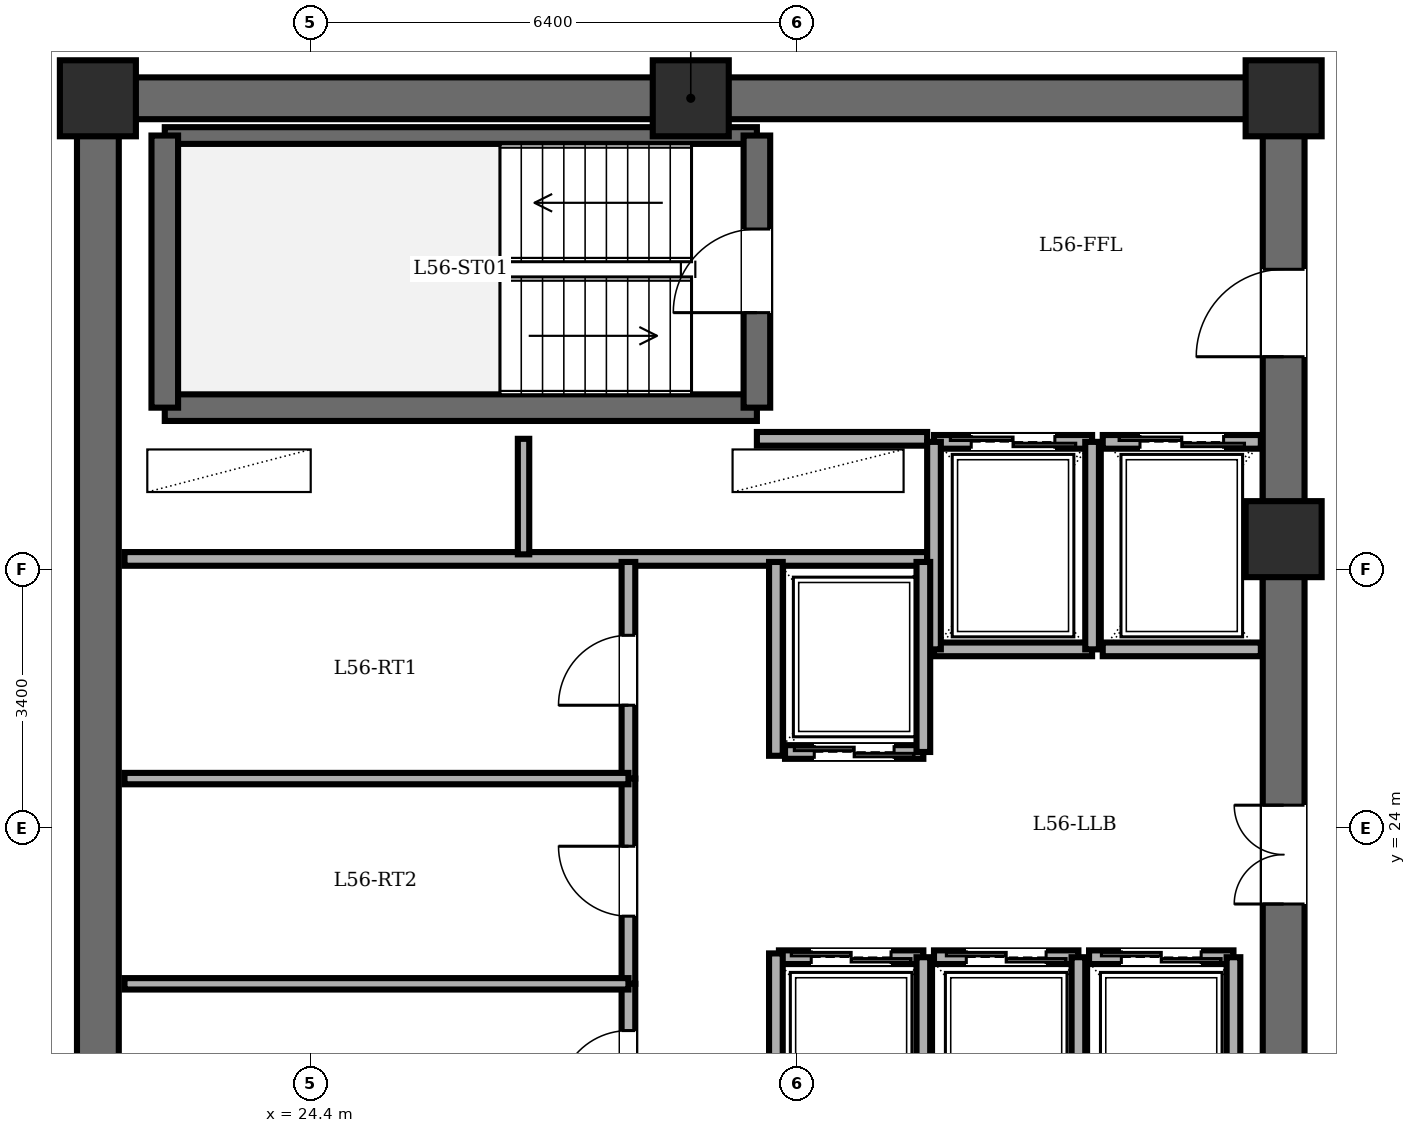
"""IFC4 building model, lengths in metres.
Left out: names, types, materials, properties, quantities, classifications, styles, units other than length and angle.
Written with IfcOpenShell. Run it as: python <this file> out.ifc"""

import sys

from ifc_helpers import new_model, si_unit, direction, frame, frame_2d, origin, origin_2d, place, context, subcontext, project, spatial, rectangle, extrude, element, fill, save


model = new_model("IFC4")
c1 = context("Model", 3, precision=1e-05, world=origin(), true_north=direction((0.0, 1.0)))
c2 = subcontext(c1, "Body", "Model", "MODEL_VIEW")
j1 = project(units=[si_unit("LENGTHUNIT", "METRE"), si_unit("PLANEANGLEUNIT", "RADIAN")], contexts=[c1])
p1 = place(None, origin())
s1 = spatial("IfcSite", under=j1, at=p1, CompositionType="ELEMENT")
p2 = place(p1, origin())
s2 = spatial("IfcBuilding", under=s1, at=p2, CompositionType="ELEMENT")
p3 = place(p2, frame((0.0, 0.0, 215.7)))
s3 = spatial("IfcBuildingStorey", under=s2, at=p3, CompositionType="ELEMENT", Elevation=215.7)
for number, where, z_axis, x_axis in (
    (1, (37.2, 27.8, 0.0), (0.0, 0.0, 1.0), (1.0, 0.0, 0.0)),
    (2, (37.2, 33.6, 0.0), (0.0, 0.0, 1.0), (1.0, 0.0, 0.0)),
    (3, (29.4, 33.6, 0.0), (0.0, 0.0, 1.0), (1.0, 0.0, 0.0)),
    (4, (21.6, 33.6, 0.0), (0.0, 0.0, 1.0), (1.0, 0.0, 0.0)),
):
    element("IfcColumn", number, at=place(p3, frame(where, z_axis=z_axis, x_axis=x_axis)), inside=s3, PredefinedType="COLUMN", context=c2, shape_type="SweptSolid", body=[
        extrude(rectangle(XDim=1.0, YDim=1.0, at=origin_2d()), origin(), (0.0, 0.0, 1.0), 3.6),
    ])
p4 = place(p3, frame((21.6, 14.4, 0.0), z_axis=(0.0, 0.0, 1.0), x_axis=(0.0, 1.0, 0.0)))
e5 = element("IfcWall", 5, at=p4, inside=s3, PredefinedType="SHEAR", context=c2, shape_type="SweptSolid", body=[
    extrude(rectangle(XDim=19.2, YDim=0.55, at=frame_2d((9.6, 0.0))), origin(), (0.0, 0.0, 1.0), 3.4),
])
p5 = place(p3, frame((21.6, 33.6, 0.0), z_axis=(0.0, 0.0, 1.0), x_axis=(1.0, 0.0, 0.0)))
e6 = element("IfcWall", 6, at=p5, inside=s3, PredefinedType="SHEAR", context=c2, shape_type="SweptSolid", body=[
    extrude(rectangle(XDim=15.6, YDim=0.55, at=frame_2d((7.8, 0.0))), origin(), (0.0, 0.0, 1.0), 3.4),
])
p6 = place(p3, frame((37.2, 14.4, 0.0), z_axis=(0.0, 0.0, 1.0), x_axis=(0.0, 1.0, 0.0)))
e7 = element("IfcWall", 7, at=p6, inside=s3, PredefinedType="SHEAR", context=c2, shape_type="SweptSolid", body=[
    extrude(rectangle(XDim=19.2, YDim=0.55, at=frame_2d((9.6, 0.0))), origin(), (0.0, 0.0, 1.0), 3.4),
])
p7 = place(p6, frame((15.8, 0.0, 0.0)))
e8 = element("IfcOpeningElement", 8, at=p7, cuts=e7, PredefinedType="OPENING", context=c2, shape_type="SweptSolid", body=[
    extrude(rectangle(XDim=1.15, YDim=2.15, at=frame_2d((0.575, 1.075))), frame((0.0, 0.285, 0.0), z_axis=(0.0, -1.0, 0.0), x_axis=(1.0, 0.0, 0.0)), (0.0, 0.0, 1.0), 0.57),
])
p8 = place(p6, frame((3.6, 0.0, 0.0)))
e9 = element("IfcOpeningElement", 9, at=p8, cuts=e7, PredefinedType="OPENING", context=c2, shape_type="SweptSolid", body=[
    extrude(rectangle(XDim=1.1, YDim=2.15, at=frame_2d((0.55, 1.075))), frame((0.0, 0.285, 0.0), z_axis=(0.0, -1.0, 0.0), x_axis=(1.0, 0.0, 0.0)), (0.0, 0.0, 1.0), 0.57),
])
p9 = place(p6, frame((8.6, 0.0, 0.0)))
e10 = element("IfcOpeningElement", 10, at=p9, cuts=e7, PredefinedType="OPENING", context=c2, shape_type="SweptSolid", body=[
    extrude(rectangle(XDim=1.3, YDim=2.2, at=frame_2d((0.65, 1.1))), frame((0.0, 0.285, 0.0), z_axis=(0.0, -1.0, 0.0), x_axis=(1.0, 0.0, 0.0)), (0.0, 0.0, 1.0), 0.57),
])
p10 = place(p3, frame((22.48, 29.53, 0.0), z_axis=(0.0, 0.0, 1.0), x_axis=(1.0, 0.0, 0.0)))
e11 = element("IfcWall", 11, at=p10, inside=s3, PredefinedType="SOLIDWALL", context=c2, shape_type="SweptSolid", body=[
    extrude(rectangle(XDim=7.79, YDim=0.35, at=frame_2d((3.895, 0.0))), origin(), (0.0, 0.0, 1.0), 3.4),
])
p11 = place(p3, frame((22.48, 33.11, 0.0), z_axis=(0.0, 0.0, 1.0), x_axis=(1.0, 0.0, 0.0)))
e12 = element("IfcWall", 12, at=p11, inside=s3, PredefinedType="PARTITIONING", context=c2, shape_type="SweptSolid", body=[
    extrude(rectangle(XDim=7.79, YDim=0.22, at=frame_2d((3.895, 0.0))), origin(), (0.0, 0.0, 1.0), 3.4),
])
p12 = place(p3, frame((22.48, 29.53, 0.0), z_axis=(0.0, 0.0, 1.0), x_axis=(0.0, 1.0, 0.0)))
e13 = element("IfcWall", 13, at=p12, inside=s3, PredefinedType="SOLIDWALL", context=c2, shape_type="SweptSolid", body=[
    extrude(rectangle(XDim=3.58, YDim=0.35, at=frame_2d((1.79, 0.0))), origin(), (0.0, 0.0, 1.0), 3.4),
])
p13 = place(p3, frame((30.27, 29.53, 0.0), z_axis=(0.0, 0.0, 1.0), x_axis=(0.0, 1.0, 0.0)))
e14 = element("IfcWall", 14, at=p13, inside=s3, PredefinedType="SOLIDWALL", context=c2, shape_type="SweptSolid", body=[
    extrude(rectangle(XDim=3.58, YDim=0.35, at=frame_2d((1.79, 0.0))), origin(), (0.0, 0.0, 1.0), 3.4),
])
p14 = place(p13, frame((1.25, 0.0, 0.0)))
e15 = element("IfcOpeningElement", 15, at=p14, cuts=e14, PredefinedType="OPENING", context=c2, shape_type="SweptSolid", body=[
    extrude(rectangle(XDim=1.1, YDim=2.15, at=frame_2d((0.55, 1.075))), frame((0.0, 0.185, 0.0), z_axis=(0.0, -1.0, 0.0), x_axis=(1.0, 0.0, 0.0)), (0.0, 0.0, 1.0), 0.37),
])
p15 = place(p3, frame((30.27, 29.12, 0.0), z_axis=(0.0, 0.0, 1.0), x_axis=(1.0, 0.0, 0.0)))
e16 = element("IfcWall", 16, at=p15, inside=s3, PredefinedType="PARTITIONING", context=c2, shape_type="SweptSolid", body=[
    extrude(rectangle(XDim=2.24, YDim=0.18, at=frame_2d((1.12, 0.0))), origin(), (0.0, 0.0, 1.0), 3.4),
])
p16 = place(p3, frame((21.95, 27.54, 0.0), z_axis=(0.0, 0.0, 1.0), x_axis=(1.0, 0.0, 0.0)))
e17 = element("IfcWall", 17, at=p16, inside=s3, PredefinedType="PARTITIONING", context=c2, shape_type="SweptSolid", body=[
    extrude(rectangle(XDim=10.56, YDim=0.18, at=frame_2d((5.28, 0.0))), origin(), (0.0, 0.0, 1.0), 3.4),
])
p17 = place(p3, frame((27.2, 27.6, 0.0), z_axis=(0.0, 0.0, 1.0), x_axis=(0.0, 1.0, 0.0)))
e18 = element("IfcWall", 18, at=p17, inside=s3, PredefinedType="PARTITIONING", context=c2, shape_type="SweptSolid", body=[
    extrude(rectangle(XDim=1.52, YDim=0.15, at=frame_2d((0.76, 0.0))), origin(), (0.0, 0.0, 1.0), 3.4),
])
p18 = place(p3, frame((32.6, 29.08, 0.0), z_axis=(0.0, 0.0, 1.0), x_axis=(1.0, 0.0, 0.0)))
e19 = element("IfcWall", 19, at=p18, inside=s3, PredefinedType="PARTITIONING", context=c2, shape_type="SweptSolid", body=[
    extrude(rectangle(XDim=2.08, YDim=0.18, at=frame_2d((1.04, 0.0))), origin(), (0.0, 0.0, 1.0), 3.4),
])
p19 = place(p18, frame((0.49, 0.0, 0.0)))
e20 = element("IfcOpeningElement", 20, at=p19, cuts=e19, PredefinedType="OPENING", context=c2, shape_type="SweptSolid", body=[
    extrude(rectangle(XDim=1.1, YDim=2.2, at=frame_2d((0.55, 1.1))), frame((0.0, 0.1, 0.0), z_axis=(0.0, -1.0, 0.0), x_axis=(1.0, 0.0, 0.0)), (0.0, 0.0, 1.0), 0.2),
])
p20 = place(p3, frame((34.68, 26.35, 0.0), z_axis=(0.0, 0.0, 1.0), x_axis=(-1.0, 0.0, 0.0)))
e21 = element("IfcWall", 21, at=p20, inside=s3, PredefinedType="PARTITIONING", context=c2, shape_type="SweptSolid", body=[
    extrude(rectangle(XDim=2.08, YDim=0.18, at=frame_2d((1.04, 0.0))), origin(), (0.0, 0.0, 1.0), 3.4),
])
for number, where, z_axis, x_axis in (
    (22, (34.68, 26.35, 0.0), (0.0, 0.0, 1.0), (0.0, 1.0, 0.0)),
    (23, (32.6, 29.08, 0.0), (0.0, 0.0, 1.0), (0.0, -1.0, 0.0)),
):
    element("IfcWall", number, at=place(p3, frame(where, z_axis=z_axis, x_axis=x_axis)), inside=s3, PredefinedType="PARTITIONING", context=c2, shape_type="SweptSolid", body=[
        extrude(rectangle(XDim=2.73, YDim=0.18, at=frame_2d((1.365, 0.0))), origin(), (0.0, 0.0, 1.0), 3.4),
    ])
p21 = place(p3, frame((34.82, 29.08, 0.0), z_axis=(0.0, 0.0, 1.0), x_axis=(1.0, 0.0, 0.0)))
e24 = element("IfcWall", 24, at=p21, inside=s3, PredefinedType="PARTITIONING", context=c2, shape_type="SweptSolid", body=[
    extrude(rectangle(XDim=2.08, YDim=0.18, at=frame_2d((1.04, 0.0))), origin(), (0.0, 0.0, 1.0), 3.4),
])
p22 = place(p21, frame((0.49, 0.0, 0.0)))
e25 = element("IfcOpeningElement", 25, at=p22, cuts=e24, PredefinedType="OPENING", context=c2, shape_type="SweptSolid", body=[
    extrude(rectangle(XDim=1.1, YDim=2.2, at=frame_2d((0.55, 1.1))), frame((0.0, 0.1, 0.0), z_axis=(0.0, -1.0, 0.0), x_axis=(1.0, 0.0, 0.0)), (0.0, 0.0, 1.0), 0.2),
])
p23 = place(p3, frame((36.9, 26.35, 0.0), z_axis=(0.0, 0.0, 1.0), x_axis=(-1.0, 0.0, 0.0)))
e26 = element("IfcWall", 26, at=p23, inside=s3, PredefinedType="PARTITIONING", context=c2, shape_type="SweptSolid", body=[
    extrude(rectangle(XDim=2.08, YDim=0.18, at=frame_2d((1.04, 0.0))), origin(), (0.0, 0.0, 1.0), 3.4),
])
p24 = place(p3, frame((32.46, 25.0, 0.0), z_axis=(0.0, 0.0, 1.0), x_axis=(-1.0, 0.0, 0.0)))
e27 = element("IfcWall", 27, at=p24, inside=s3, PredefinedType="PARTITIONING", context=c2, shape_type="SweptSolid", body=[
    extrude(rectangle(XDim=1.82, YDim=0.18, at=frame_2d((0.91, 0.0))), origin(), (0.0, 0.0, 1.0), 3.4),
])
p25 = place(p24, frame((0.385, 0.0, 0.0)))
e28 = element("IfcOpeningElement", 28, at=p25, cuts=e27, PredefinedType="OPENING", context=c2, shape_type="SweptSolid", body=[
    extrude(rectangle(XDim=1.05, YDim=2.2, at=frame_2d((0.525, 1.1))), frame((0.0, 0.1, 0.0), z_axis=(0.0, -1.0, 0.0), x_axis=(1.0, 0.0, 0.0)), (0.0, 0.0, 1.0), 0.2),
])
p26 = place(p3, frame((32.46, 25.0, 0.0), z_axis=(0.0, 0.0, 1.0), x_axis=(0.0, 1.0, 0.0)))
e29 = element("IfcWall", 29, at=p26, inside=s3, PredefinedType="PARTITIONING", context=c2, shape_type="SweptSolid", body=[
    extrude(rectangle(XDim=2.5, YDim=0.18, at=frame_2d((1.25, 0.0))), origin(), (0.0, 0.0, 1.0), 3.4),
])
p27 = place(p3, frame((30.56, 22.3, 0.0), z_axis=(0.0, 0.0, 1.0), x_axis=(1.0, 0.0, 0.0)))
e30 = element("IfcWall", 30, at=p27, inside=s3, PredefinedType="PARTITIONING", context=c2, shape_type="SweptSolid", body=[
    extrude(rectangle(XDim=1.9, YDim=0.18, at=frame_2d((0.95, 0.0))), origin(), (0.0, 0.0, 1.0), 3.4),
])
p28 = place(p27, frame((0.425, 0.0, 0.0)))
e31 = element("IfcOpeningElement", 31, at=p28, cuts=e30, PredefinedType="OPENING", context=c2, shape_type="SweptSolid", body=[
    extrude(rectangle(XDim=1.05, YDim=2.2, at=frame_2d((0.525, 1.1))), frame((0.0, 0.1, 0.0), z_axis=(0.0, -1.0, 0.0), x_axis=(1.0, 0.0, 0.0)), (0.0, 0.0, 1.0), 0.2),
])
p29 = place(p3, frame((32.46, 19.8, 0.0), z_axis=(0.0, 0.0, 1.0), x_axis=(0.0, 1.0, 0.0)))
e32 = element("IfcWall", 32, at=p29, inside=s3, PredefinedType="PARTITIONING", context=c2, shape_type="SweptSolid", body=[
    extrude(rectangle(XDim=2.5, YDim=0.18, at=frame_2d((1.25, 0.0))), origin(), (0.0, 0.0, 1.0), 3.4),
])
p30 = place(p3, frame((32.6, 22.3, 0.0), z_axis=(0.0, 0.0, 1.0), x_axis=(1.0, 0.0, 0.0)))
e33 = element("IfcWall", 33, at=p30, inside=s3, PredefinedType="PARTITIONING", context=c2, shape_type="SweptSolid", body=[
    extrude(rectangle(XDim=1.9, YDim=0.18, at=frame_2d((0.95, 0.0))), origin(), (0.0, 0.0, 1.0), 3.4),
])
p31 = place(p30, frame((0.425, 0.0, 0.0)))
e34 = element("IfcOpeningElement", 34, at=p31, cuts=e33, PredefinedType="OPENING", context=c2, shape_type="SweptSolid", body=[
    extrude(rectangle(XDim=1.05, YDim=2.2, at=frame_2d((0.525, 1.1))), frame((0.0, 0.1, 0.0), z_axis=(0.0, -1.0, 0.0), x_axis=(1.0, 0.0, 0.0)), (0.0, 0.0, 1.0), 0.2),
])
p32 = place(p3, frame((34.5, 19.8, 0.0), z_axis=(0.0, 0.0, 1.0), x_axis=(0.0, 1.0, 0.0)))
e35 = element("IfcWall", 35, at=p32, inside=s3, PredefinedType="PARTITIONING", context=c2, shape_type="SweptSolid", body=[
    extrude(rectangle(XDim=2.5, YDim=0.18, at=frame_2d((1.25, 0.0))), origin(), (0.0, 0.0, 1.0), 3.4),
])
p33 = place(p3, frame((34.64, 22.3, 0.0), z_axis=(0.0, 0.0, 1.0), x_axis=(1.0, 0.0, 0.0)))
e36 = element("IfcWall", 36, at=p33, inside=s3, PredefinedType="PARTITIONING", context=c2, shape_type="SweptSolid", body=[
    extrude(rectangle(XDim=1.9, YDim=0.18, at=frame_2d((0.95, 0.0))), origin(), (0.0, 0.0, 1.0), 3.4),
])
p34 = place(p33, frame((0.425, 0.0, 0.0)))
e37 = element("IfcOpeningElement", 37, at=p34, cuts=e36, PredefinedType="OPENING", context=c2, shape_type="SweptSolid", body=[
    extrude(rectangle(XDim=1.05, YDim=2.2, at=frame_2d((0.525, 1.1))), frame((0.0, 0.1, 0.0), z_axis=(0.0, -1.0, 0.0), x_axis=(1.0, 0.0, 0.0)), (0.0, 0.0, 1.0), 0.2),
])
p35 = place(p3, frame((36.54, 19.8, 0.0), z_axis=(0.0, 0.0, 1.0), x_axis=(0.0, 1.0, 0.0)))
e38 = element("IfcWall", 38, at=p35, inside=s3, PredefinedType="PARTITIONING", context=c2, shape_type="SweptSolid", body=[
    extrude(rectangle(XDim=2.5, YDim=0.18, at=frame_2d((1.25, 0.0))), origin(), (0.0, 0.0, 1.0), 3.4),
])
for number, where, z_axis, x_axis in (
    (39, (30.52, 24.95, 0.0), (0.0, 0.0, 1.0), (0.0, 1.0, 0.0)),
    (40, (30.52, 19.8, 0.0), (0.0, 0.0, 1.0), (0.0, 1.0, 0.0)),
):
    element("IfcWall", number, at=place(p3, frame(where, z_axis=z_axis, x_axis=x_axis)), inside=s3, PredefinedType="PARTITIONING", context=c2, shape_type="SweptSolid", body=[
        extrude(rectangle(XDim=2.55, YDim=0.18, at=frame_2d((1.275, 0.0))), origin(), (0.0, 0.0, 1.0), 3.4),
    ])
p36 = place(p3, frame((28.58, 24.65, 0.0), z_axis=(0.0, 0.0, 1.0), x_axis=(0.0, 1.0, 0.0)))
e41 = element("IfcWall", 41, at=p36, inside=s3, PredefinedType="PARTITIONING", context=c2, shape_type="SweptSolid", body=[
    extrude(rectangle(XDim=2.85, YDim=0.18, at=frame_2d((1.425, 0.0))), origin(), (0.0, 0.0, 1.0), 3.4),
])
p37 = place(p36, frame((0.965, 0.0, 0.0)))
e42 = element("IfcOpeningElement", 42, at=p37, cuts=e41, PredefinedType="OPENING", context=c2, shape_type="SweptSolid", body=[
    extrude(rectangle(XDim=0.92, YDim=2.1, at=frame_2d((0.46, 1.05))), frame((0.0, 0.1, 0.0), z_axis=(0.0, -1.0, 0.0), x_axis=(1.0, 0.0, 0.0)), (0.0, 0.0, 1.0), 0.2),
])
p38 = place(p3, frame((28.58, 21.95, 0.0), z_axis=(0.0, 0.0, 1.0), x_axis=(0.0, 1.0, 0.0)))
e43 = element("IfcWall", 43, at=p38, inside=s3, PredefinedType="PARTITIONING", context=c2, shape_type="SweptSolid", body=[
    extrude(rectangle(XDim=2.7, YDim=0.18, at=frame_2d((1.35, 0.0))), origin(), (0.0, 0.0, 1.0), 3.4),
])
p39 = place(p38, frame((0.89, 0.0, 0.0)))
e44 = element("IfcOpeningElement", 44, at=p39, cuts=e43, PredefinedType="OPENING", context=c2, shape_type="SweptSolid", body=[
    extrude(rectangle(XDim=0.92, YDim=2.1, at=frame_2d((0.46, 1.05))), frame((0.0, 0.1, 0.0), z_axis=(0.0, -1.0, 0.0), x_axis=(1.0, 0.0, 0.0)), (0.0, 0.0, 1.0), 0.2),
])
p40 = place(p3, frame((28.58, 19.8, 0.0), z_axis=(0.0, 0.0, 1.0), x_axis=(0.0, 1.0, 0.0)))
e45 = element("IfcWall", 45, at=p40, inside=s3, PredefinedType="PARTITIONING", context=c2, shape_type="SweptSolid", body=[
    extrude(rectangle(XDim=2.15, YDim=0.18, at=frame_2d((1.075, 0.0))), origin(), (0.0, 0.0, 1.0), 3.4),
])
p41 = place(p40, frame((0.615, 0.0, 0.0)))
e46 = element("IfcOpeningElement", 46, at=p41, cuts=e45, PredefinedType="OPENING", context=c2, shape_type="SweptSolid", body=[
    extrude(rectangle(XDim=0.92, YDim=2.1, at=frame_2d((0.46, 1.05))), frame((0.0, 0.1, 0.0), z_axis=(0.0, -1.0, 0.0), x_axis=(1.0, 0.0, 0.0)), (0.0, 0.0, 1.0), 0.2),
])
for number, where, z_axis, x_axis in (
    (47, (21.95, 24.65, 0.0), (0.0, 0.0, 1.0), (1.0, 0.0, 0.0)),
    (48, (21.95, 21.95, 0.0), (0.0, 0.0, 1.0), (1.0, 0.0, 0.0)),
):
    element("IfcWall", number, at=place(p3, frame(where, z_axis=z_axis, x_axis=x_axis)), inside=s3, PredefinedType="PARTITIONING", context=c2, shape_type="SweptSolid", body=[
        extrude(rectangle(XDim=6.63, YDim=0.15, at=frame_2d((3.315, 0.0))), origin(), (0.0, 0.0, 1.0), 3.4),
    ])
p42 = place(p14, origin())
e49 = element("IfcDoor", 49, at=p42, inside=s3, OperationType="SINGLE_SWING_LEFT", PredefinedType="DOOR", context=c2, shape_type="SweptSolid", body=[
    extrude(rectangle(XDim=1.1, YDim=2.15, at=frame_2d((0.55, 1.075))), frame((0.0, 0.025, 0.0), z_axis=(0.0, -1.0, 0.0), x_axis=(1.0, 0.0, 0.0)), (0.0, 0.0, 1.0), 0.05),
])
fill(e15, e49)
p43 = place(p7, origin())
e50 = element("IfcDoor", 50, at=p43, inside=s3, OperationType="SINGLE_SWING_LEFT", PredefinedType="DOOR", context=c2, shape_type="SweptSolid", body=[
    extrude(rectangle(XDim=1.15, YDim=2.15, at=frame_2d((0.575, 1.075))), frame((0.0, 0.025, 0.0), z_axis=(0.0, -1.0, 0.0), x_axis=(1.0, 0.0, 0.0)), (0.0, 0.0, 1.0), 0.05),
])
fill(e8, e50)
p44 = place(p19, origin())
e51 = element("IfcDoor", 51, at=p44, inside=s3, OperationType="DOUBLE_DOOR_SLIDING", PredefinedType="DOOR", context=c2, shape_type="SweptSolid", body=[
    extrude(rectangle(XDim=1.1, YDim=2.2, at=frame_2d((0.55, 1.1))), frame((0.0, 0.025, 0.0), z_axis=(0.0, -1.0, 0.0), x_axis=(1.0, 0.0, 0.0)), (0.0, 0.0, 1.0), 0.05),
])
fill(e20, e51)
p45 = place(p22, origin())
e52 = element("IfcDoor", 52, at=p45, inside=s3, OperationType="DOUBLE_DOOR_SLIDING", PredefinedType="DOOR", context=c2, shape_type="SweptSolid", body=[
    extrude(rectangle(XDim=1.1, YDim=2.2, at=frame_2d((0.55, 1.1))), frame((0.0, 0.025, 0.0), z_axis=(0.0, -1.0, 0.0), x_axis=(1.0, 0.0, 0.0)), (0.0, 0.0, 1.0), 0.05),
])
fill(e25, e52)
p46 = place(p25, origin())
e53 = element("IfcDoor", 53, at=p46, inside=s3, OperationType="DOUBLE_DOOR_SLIDING", PredefinedType="DOOR", context=c2, shape_type="SweptSolid", body=[
    extrude(rectangle(XDim=1.05, YDim=2.2, at=frame_2d((0.525, 1.1))), frame((0.0, 0.025, 0.0), z_axis=(0.0, -1.0, 0.0), x_axis=(1.0, 0.0, 0.0)), (0.0, 0.0, 1.0), 0.05),
])
fill(e28, e53)
p47 = place(p28, origin())
e54 = element("IfcDoor", 54, at=p47, inside=s3, OperationType="DOUBLE_DOOR_SLIDING", PredefinedType="DOOR", context=c2, shape_type="SweptSolid", body=[
    extrude(rectangle(XDim=1.05, YDim=2.2, at=frame_2d((0.525, 1.1))), frame((0.0, 0.025, 0.0), z_axis=(0.0, -1.0, 0.0), x_axis=(1.0, 0.0, 0.0)), (0.0, 0.0, 1.0), 0.05),
])
fill(e31, e54)
p48 = place(p31, origin())
e55 = element("IfcDoor", 55, at=p48, inside=s3, OperationType="DOUBLE_DOOR_SLIDING", PredefinedType="DOOR", context=c2, shape_type="SweptSolid", body=[
    extrude(rectangle(XDim=1.05, YDim=2.2, at=frame_2d((0.525, 1.1))), frame((0.0, 0.025, 0.0), z_axis=(0.0, -1.0, 0.0), x_axis=(1.0, 0.0, 0.0)), (0.0, 0.0, 1.0), 0.05),
])
fill(e34, e55)
p49 = place(p34, origin())
e56 = element("IfcDoor", 56, at=p49, inside=s3, OperationType="DOUBLE_DOOR_SLIDING", PredefinedType="DOOR", context=c2, shape_type="SweptSolid", body=[
    extrude(rectangle(XDim=1.05, YDim=2.2, at=frame_2d((0.525, 1.1))), frame((0.0, 0.025, 0.0), z_axis=(0.0, -1.0, 0.0), x_axis=(1.0, 0.0, 0.0)), (0.0, 0.0, 1.0), 0.05),
])
fill(e37, e56)
p50 = place(p37, origin())
e57 = element("IfcDoor", 57, at=p50, inside=s3, OperationType="SINGLE_SWING_LEFT", PredefinedType="DOOR", context=c2, shape_type="SweptSolid", body=[
    extrude(rectangle(XDim=0.92, YDim=2.1, at=frame_2d((0.46, 1.05))), frame((0.0, 0.025, 0.0), z_axis=(0.0, -1.0, 0.0), x_axis=(1.0, 0.0, 0.0)), (0.0, 0.0, 1.0), 0.05),
])
fill(e42, e57)
p51 = place(p39, origin())
e58 = element("IfcDoor", 58, at=p51, inside=s3, OperationType="SINGLE_SWING_RIGHT", PredefinedType="DOOR", context=c2, shape_type="SweptSolid", body=[
    extrude(rectangle(XDim=0.92, YDim=2.1, at=frame_2d((0.46, 1.05))), frame((0.0, 0.025, 0.0), z_axis=(0.0, -1.0, 0.0), x_axis=(1.0, 0.0, 0.0)), (0.0, 0.0, 1.0), 0.05),
])
fill(e44, e58)
p52 = place(p41, origin())
e59 = element("IfcDoor", 59, at=p52, inside=s3, OperationType="SINGLE_SWING_LEFT", PredefinedType="DOOR", context=c2, shape_type="SweptSolid", body=[
    extrude(rectangle(XDim=0.92, YDim=2.1, at=frame_2d((0.46, 1.05))), frame((0.0, 0.025, 0.0), z_axis=(0.0, -1.0, 0.0), x_axis=(1.0, 0.0, 0.0)), (0.0, 0.0, 1.0), 0.05),
])
fill(e46, e59)
p53 = place(p9, origin())
e60 = element("IfcDoor", 60, at=p53, inside=s3, OperationType="DOUBLE_DOOR_SINGLE_SWING", PredefinedType="DOOR", context=c2, shape_type="SweptSolid", body=[
    extrude(rectangle(XDim=1.3, YDim=2.2, at=frame_2d((0.65, 1.1))), frame((0.0, 0.025, 0.0), z_axis=(0.0, -1.0, 0.0), x_axis=(1.0, 0.0, 0.0)), (0.0, 0.0, 1.0), 0.05),
])
fill(e10, e60)
save(model, sys.argv[1])
